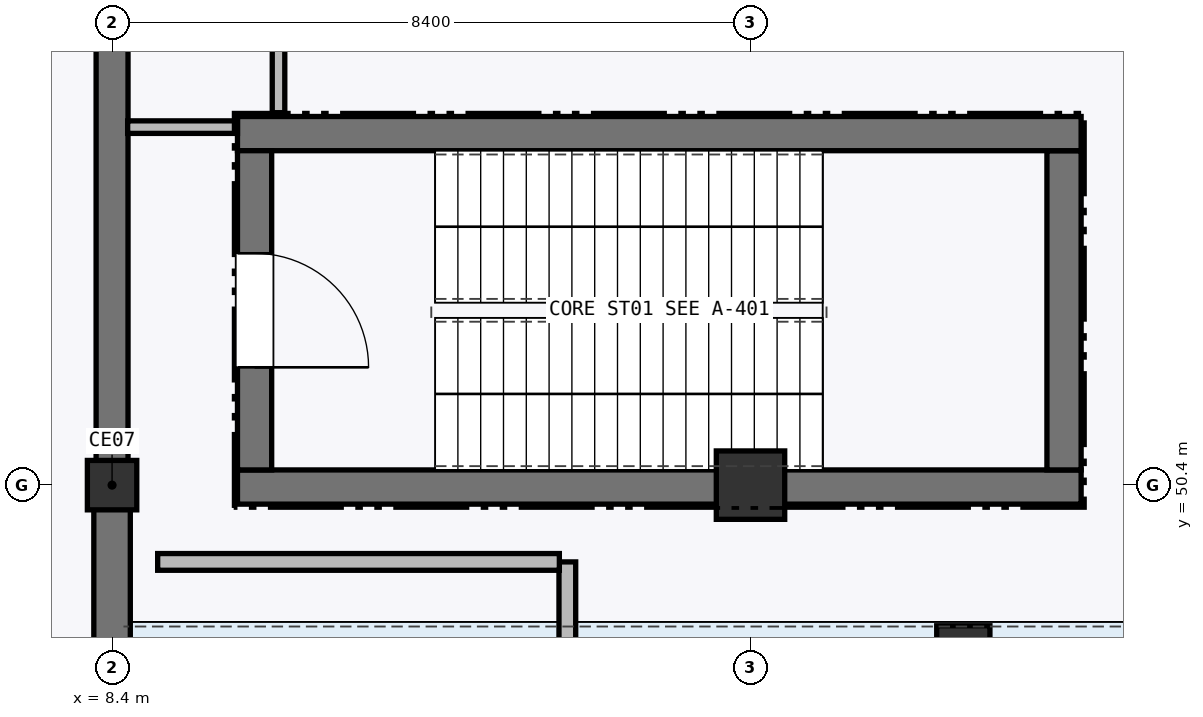
"""IFC4 building model, lengths in metres.
Left out: names, types, materials, properties, quantities, classifications, styles, units other than length and angle.
Written with IfcOpenShell. Run it as: python <this file> out.ifc"""

import sys

from ifc_helpers import new_model, si_unit, direction, frame, frame_2d, origin, origin_2d, place, context, subcontext, project, spatial, rectangle, extrude, element, fill, save


model = new_model("IFC4")
c1 = context("Model", 3, precision=1e-05, world=origin(), true_north=direction((0.0, 1.0)))
c2 = subcontext(c1, "Body", "Model", "MODEL_VIEW")
j1 = project(units=[si_unit("LENGTHUNIT", "METRE"), si_unit("PLANEANGLEUNIT", "RADIAN")], contexts=[c1])
p1 = place(None, origin())
s1 = spatial("IfcSite", under=j1, at=p1, CompositionType="ELEMENT")
p2 = place(p1, origin())
s2 = spatial("IfcBuilding", under=s1, at=p2, CompositionType="ELEMENT")
p3 = place(p2, frame((0.0, 0.0, -5.4)))
s3 = spatial("IfcBuildingStorey", under=s2, at=p3, CompositionType="ELEMENT", Elevation=-5.4)
p4 = place(p3, frame((8.4, 50.4, 0.0), z_axis=(0.0, 0.0, 1.0), x_axis=(1.0, 0.0, 0.0)))
e1 = element("IfcColumn", 1, at=p4, inside=s3, PredefinedType="COLUMN", context=c2, shape_type="SweptSolid", body=[
    extrude(rectangle(XDim=0.65, YDim=0.65, at=origin_2d()), origin(), (0.0, 0.0, 1.0), 5.4),
])
p5 = place(p3, frame((16.8, 50.4, 0.0), z_axis=(0.0, 0.0, 1.0), x_axis=(1.0, 0.0, 0.0)))
e2 = element("IfcColumn", 2, at=p5, inside=s3, PredefinedType="COLUMN", context=c2, shape_type="SweptSolid", body=[
    extrude(rectangle(XDim=0.9, YDim=0.9, at=origin_2d()), origin(), (0.0, 0.0, 1.0), 5.4),
])
p6 = place(p3, frame((19.6, 48.2, 0.0), z_axis=(0.0, 0.0, 1.0), x_axis=(1.0, 0.0, 0.0)))
e3 = element("IfcColumn", 3, at=p6, inside=s3, PredefinedType="COLUMN", context=c2, shape_type="SweptSolid", body=[
    extrude(rectangle(XDim=0.7, YDim=0.7, at=origin_2d()), origin(), (0.0, 0.0, 1.0), 2.553),
])
p7 = place(p3, frame((8.4, 42.0, 0.0), z_axis=(0.0, 0.0, 1.0), x_axis=(0.0, 1.0, 0.0)))
e4 = element("IfcWall", 4, at=p7, inside=s3, PredefinedType="USERDEFINED", context=c2, shape_type="SweptSolid", body=[
    extrude(rectangle(XDim=8.4, YDim=0.48, at=frame_2d((4.2, 0.0))), origin(), (0.0, 0.0, 1.0), 5.1),
])
p8 = place(p3, frame((8.4, 50.4, 0.0), z_axis=(0.0, 0.0, 1.0), x_axis=(0.0, 1.0, 0.0)))
e5 = element("IfcWall", 5, at=p8, inside=s3, PredefinedType="USERDEFINED", context=c2, shape_type="SweptSolid", body=[
    extrude(rectangle(XDim=8.4, YDim=0.42, at=frame_2d((4.2, 0.0))), origin(), (0.0, 0.0, 1.0), 5.13),
])
p9 = place(p3, frame((10.05, 50.375, 0.0), z_axis=(0.0, 0.0, 1.0), x_axis=(1.0, 0.0, 0.0)))
e6 = element("IfcWall", 6, at=p9, inside=s3, PredefinedType="SHEAR", context=c2, shape_type="SweptSolid", body=[
    extrude(rectangle(XDim=11.1, YDim=0.45, at=frame_2d((5.55, 0.0))), origin(), (0.0, 0.0, 1.0), 5.145),
])
p10 = place(p3, frame((20.925, 50.6, 0.0), z_axis=(0.0, 0.0, 1.0), x_axis=(0.0, 1.0, 0.0)))
e7 = element("IfcWall", 7, at=p10, inside=s3, PredefinedType="SHEAR", context=c2, shape_type="SweptSolid", body=[
    extrude(rectangle(XDim=4.2, YDim=0.45, at=frame_2d((2.1, 0.0))), origin(), (0.0, 0.0, 1.0), 5.145),
])
p11 = place(p3, frame((21.15, 55.025, 0.0), z_axis=(0.0, 0.0, 1.0), x_axis=(-1.0, 0.0, 0.0)))
e8 = element("IfcWall", 8, at=p11, inside=s3, PredefinedType="SHEAR", context=c2, shape_type="SweptSolid", body=[
    extrude(rectangle(XDim=11.1, YDim=0.45, at=frame_2d((5.55, 0.0))), origin(), (0.0, 0.0, 1.0), 5.145),
])
p12 = place(p3, frame((10.275, 54.8, 0.0), z_axis=(0.0, 0.0, 1.0), x_axis=(0.0, -1.0, 0.0)))
e9 = element("IfcWall", 9, at=p12, inside=s3, PredefinedType="SHEAR", context=c2, shape_type="SweptSolid", body=[
    extrude(rectangle(XDim=4.2, YDim=0.45, at=frame_2d((2.1, 0.0))), origin(), (0.0, 0.0, 1.0), 5.145),
])
p13 = place(p12, frame((1.35, 0.0, 0.0)))
e10 = element("IfcOpeningElement", 10, at=p13, cuts=e9, PredefinedType="OPENING", context=c2, shape_type="SweptSolid", body=[
    extrude(rectangle(XDim=1.5, YDim=2.15, at=frame_2d((0.75, 1.075))), frame((0.0, 0.235, 0.0), z_axis=(0.0, -1.0, 0.0), x_axis=(1.0, 0.0, 0.0)), (0.0, 0.0, 1.0), 0.47),
])
p14 = place(p3, frame((8.605, 55.11, 0.0), z_axis=(0.0, 0.0, 1.0), x_axis=(1.0, 0.0, 0.0)))
e11 = element("IfcWall", 11, at=p14, inside=s3, PredefinedType="PARTITIONING", context=c2, shape_type="SweptSolid", body=[
    extrude(rectangle(XDim=1.445, YDim=0.165, at=frame_2d((0.723, 0.0))), origin(), (0.0, 0.0, 1.0), 5.145),
])
p15 = place(p3, frame((10.59, 55.3, 0.0), z_axis=(0.0, 0.0, 1.0), x_axis=(0.0, 1.0, 0.0)))
e12 = element("IfcWall", 12, at=p15, inside=s3, PredefinedType="PARTITIONING", context=c2, shape_type="SweptSolid", body=[
    extrude(rectangle(XDim=8.045, YDim=0.165, at=frame_2d((4.022, 0.0))), origin(), (0.0, 0.0, 1.0), 5.145),
])
p16 = place(p3, frame((14.39, 42.205, 0.0), z_axis=(0.0, 0.0, 1.0), x_axis=(0.0, 1.0, 0.0)))
e13 = element("IfcWall", 13, at=p16, inside=s3, PredefinedType="PARTITIONING", context=c2, shape_type="SweptSolid", body=[
    extrude(rectangle(XDim=7.185, YDim=0.22, at=frame_2d((3.592, 0.0))), origin(), (0.0, 0.0, 1.0), 5.145),
])
p17 = place(p16, frame((2.593, 0.0, 0.0)))
e14 = element("IfcOpeningElement", 14, at=p17, cuts=e13, PredefinedType="OPENING", context=c2, shape_type="SweptSolid", body=[
    extrude(rectangle(XDim=2.0, YDim=2.2, at=frame_2d((1.0, 1.1))), frame((0.0, 0.12, 0.0), z_axis=(0.0, -1.0, 0.0), x_axis=(1.0, 0.0, 0.0)), (0.0, 0.0, 1.0), 0.24),
])
p18 = place(p3, frame((14.285, 49.39, 0.0), z_axis=(0.0, 0.0, 1.0), x_axis=(-1.0, 0.0, 0.0)))
e15 = element("IfcWall", 15, at=p18, inside=s3, PredefinedType="PARTITIONING", context=c2, shape_type="SweptSolid", body=[
    extrude(rectangle(XDim=5.285, YDim=0.22, at=frame_2d((2.643, 0.0))), origin(), (0.0, 0.0, 1.0), 5.145),
])
p19 = place(p13, origin())
e16 = element("IfcDoor", 16, at=p19, inside=s3, OperationType="SINGLE_SWING_RIGHT", PredefinedType="DOOR", context=c2, shape_type="SweptSolid", body=[
    extrude(rectangle(XDim=1.5, YDim=2.15, at=frame_2d((0.75, 1.075))), frame((0.0, 0.025, 0.0), z_axis=(0.0, -1.0, 0.0), x_axis=(1.0, 0.0, 0.0)), (0.0, 0.0, 1.0), 0.05),
])
fill(e10, e16)
save(model, sys.argv[1])
